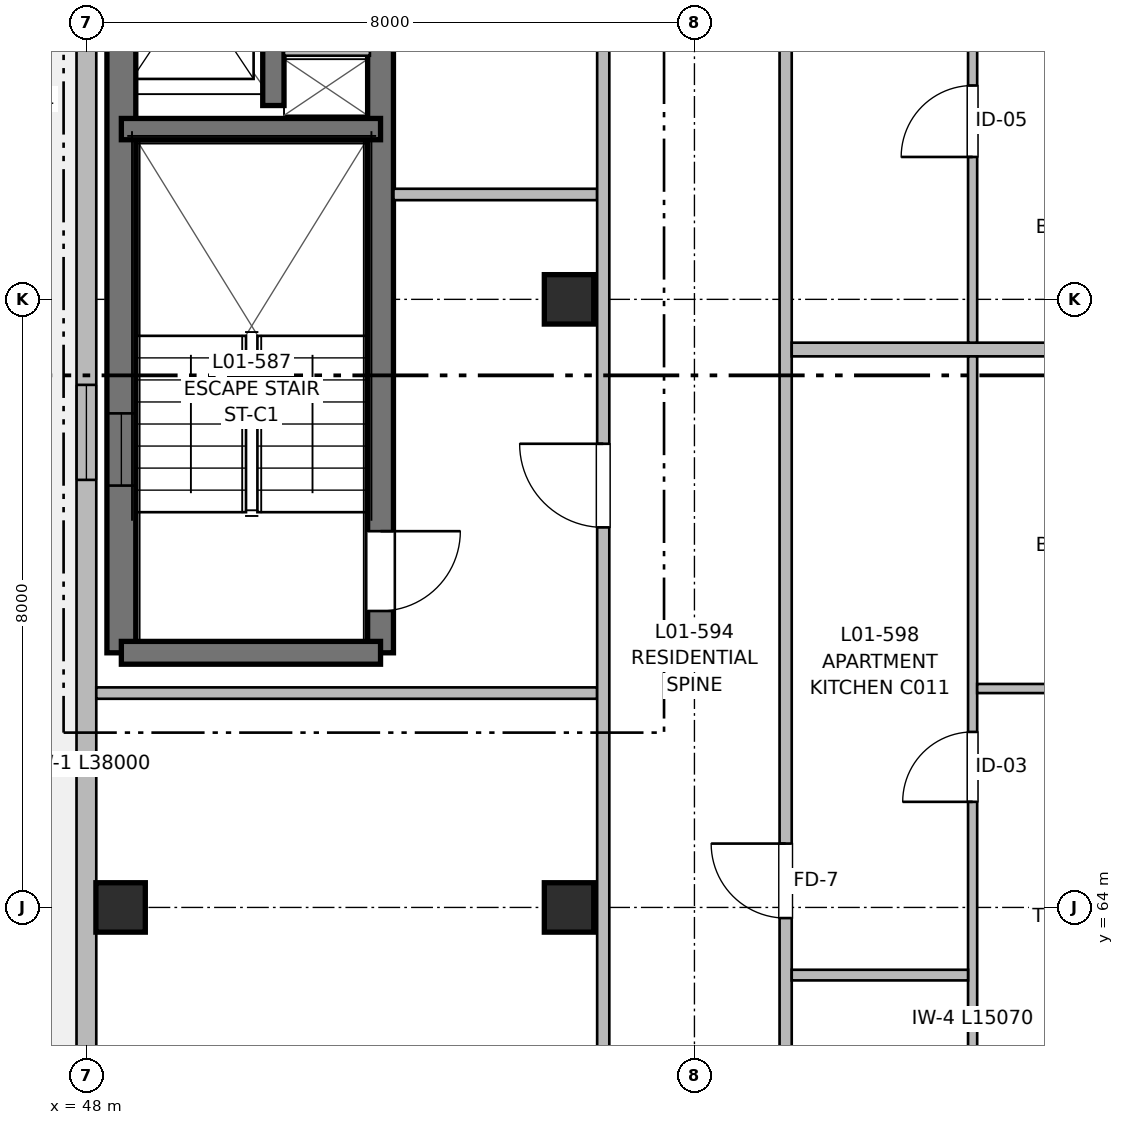
"""IFC4 building model, lengths in metres.
Left out: names, types, materials, properties, quantities, classifications, styles, units other than length and angle.
Written with IfcOpenShell. Run it as: python <this file> out.ifc"""

import sys

from ifc_helpers import new_model, si_unit, direction, frame, frame_2d, origin, origin_2d, place, context, subcontext, project, spatial, rectangle, extrude, element, fill, save


model = new_model("IFC4")
c1 = context("Model", 3, precision=1e-05, world=origin(), true_north=direction((0.0, 1.0)))
c2 = subcontext(c1, "Body", "Model", "MODEL_VIEW")
j1 = project(units=[si_unit("LENGTHUNIT", "METRE"), si_unit("PLANEANGLEUNIT", "RADIAN")], contexts=[c1])
p1 = place(None, origin())
s1 = spatial("IfcSite", under=j1, at=p1, CompositionType="ELEMENT")
p2 = place(p1, origin())
s2 = spatial("IfcBuilding", under=s1, at=p2, CompositionType="ELEMENT")
p3 = place(p2, frame((0.0, 0.0, 4.16)))
s3 = spatial("IfcBuildingStorey", under=s2, at=p3, CompositionType="ELEMENT", Elevation=4.16)
for number, where, z_axis, x_axis in (
    (1, (48.45, 64.0, 0.0), (0.0, 0.0, 1.0), (1.0, 0.0, 0.0)),
    (2, (54.35, 64.0, 0.0), (0.0, 0.0, 1.0), (1.0, 0.0, 0.0)),
    (3, (54.35, 72.0, 0.0), (0.0, 0.0, 1.0), (1.0, 0.0, 0.0)),
):
    element("IfcColumn", number, at=place(p3, frame(where, z_axis=z_axis, x_axis=x_axis)), inside=s3, PredefinedType="COLUMN", context=c2, shape_type="SweptSolid", body=[
        extrude(rectangle(XDim=0.65, YDim=0.65, at=origin_2d()), origin(), (0.0, 0.0, 1.0), 3.2),
    ])
p4 = place(p3, frame((48.46, 67.35, 0.0), z_axis=(0.0, 0.0, 1.0), x_axis=(0.0, 1.0, 0.0)))
e4 = element("IfcWall", 4, at=p4, inside=s3, PredefinedType="SHEAR", context=c2, shape_type="SweptSolid", body=[
    extrude(rectangle(XDim=12.45, YDim=0.38, at=frame_2d((6.225, 0.0))), origin(), (0.0, 0.0, 1.0), 3.2),
])
p5 = place(p4, frame((2.2, 0.0, 0.97)))
e5 = element("IfcOpeningElement", 5, at=p5, cuts=e4, PredefinedType="OPENING", context=c2, shape_type="SweptSolid", body=[
    extrude(rectangle(XDim=0.95, YDim=1.25, at=frame_2d((0.475, 0.625))), frame((0.0, 0.2, 0.0), z_axis=(0.0, -1.0, 0.0), x_axis=(1.0, 0.0, 0.0)), (0.0, 0.0, 1.0), 0.4),
])
p6 = place(p3, frame((51.87, 79.8, 0.0), z_axis=(0.0, 0.0, 1.0), x_axis=(0.0, -1.0, 0.0)))
e6 = element("IfcWall", 6, at=p6, inside=s3, PredefinedType="SHEAR", context=c2, shape_type="SweptSolid", body=[
    extrude(rectangle(XDim=12.45, YDim=0.34, at=frame_2d((6.225, 0.0))), origin(), (0.0, 0.0, 1.0), 3.2),
])
p7 = place(p6, frame((10.85, 0.0, 0.0)))
e7 = element("IfcOpeningElement", 7, at=p7, cuts=e6, PredefinedType="OPENING", context=c2, shape_type="SweptSolid", body=[
    extrude(rectangle(XDim=1.05, YDim=2.15, at=frame_2d((0.525, 1.075))), frame((0.0, 0.18, 0.0), z_axis=(0.0, -1.0, 0.0), x_axis=(1.0, 0.0, 0.0)), (0.0, 0.0, 1.0), 0.36),
])
p8 = place(p3, frame((51.87, 67.35, 0.0), z_axis=(0.0, 0.0, 1.0), x_axis=(-1.0, 0.0, 0.0)))
e8 = element("IfcWall", 8, at=p8, inside=s3, PredefinedType="SHEAR", context=c2, shape_type="SweptSolid", body=[
    extrude(rectangle(XDim=3.41, YDim=0.3, at=frame_2d((1.705, 0.0))), origin(), (0.0, 0.0, 1.0), 3.2),
])
p9 = place(p3, frame((48.46, 74.24, 0.0), z_axis=(0.0, 0.0, 1.0), x_axis=(1.0, 0.0, 0.0)))
e9 = element("IfcWall", 9, at=p9, inside=s3, PredefinedType="SHEAR", context=c2, shape_type="SweptSolid", body=[
    extrude(rectangle(XDim=3.41, YDim=0.28, at=frame_2d((1.705, 0.0))), origin(), (0.0, 0.0, 1.0), 3.2),
])
p10 = place(p3, frame((50.46, 74.55, 0.0), z_axis=(0.0, 0.0, 1.0), x_axis=(0.0, 1.0, 0.0)))
e10 = element("IfcWall", 10, at=p10, inside=s3, PredefinedType="SHEAR", context=c2, shape_type="SweptSolid", body=[
    extrude(rectangle(XDim=5.25, YDim=0.28, at=frame_2d((2.625, 0.0))), origin(), (0.0, 0.0, 1.0), 3.2),
])
p11 = place(p10, frame((1.15, 0.0, 0.0)))
e11 = element("IfcOpeningElement", 11, at=p11, cuts=e10, PredefinedType="OPENING", context=c2, shape_type="SweptSolid", body=[
    extrude(rectangle(XDim=1.0, YDim=2.15, at=frame_2d((0.5, 1.075))), frame((0.0, 0.15, 0.0), z_axis=(0.0, -1.0, 0.0), x_axis=(1.0, 0.0, 0.0)), (0.0, 0.0, 1.0), 0.3),
])
p12 = place(p10, frame((3.85, 0.0, 0.0)))
e12 = element("IfcOpeningElement", 12, at=p12, cuts=e10, PredefinedType="OPENING", context=c2, shape_type="SweptSolid", body=[
    extrude(rectangle(XDim=0.9, YDim=2.15, at=frame_2d((0.45, 1.075))), frame((0.0, 0.15, 0.0), z_axis=(0.0, -1.0, 0.0), x_axis=(1.0, 0.0, 0.0)), (0.0, 0.0, 1.0), 0.3),
])
p13 = place(p3, frame((50.6, 75.28, 0.0), z_axis=(0.0, 0.0, 1.0), x_axis=(1.0, 0.0, 0.0)))
e13 = element("IfcWall", 13, at=p13, inside=s3, PredefinedType="PARTITIONING", context=c2, shape_type="SweptSolid", body=[
    extrude(rectangle(XDim=1.13, YDim=0.15, at=frame_2d((0.565, 0.0))), origin(), (0.0, 0.0, 1.0), 2.95),
])
p14 = place(p3, frame((48.0, 56.0, 0.0), z_axis=(0.0, 0.0, 1.0), x_axis=(0.0, 1.0, 0.0)))
e14 = element("IfcWall", 14, at=p14, inside=s3, PredefinedType="SOLIDWALL", context=c2, shape_type="SweptSolid", body=[
    extrude(rectangle(XDim=38.0, YDim=0.26, at=frame_2d((19.0, 0.0))), origin(), (0.0, 0.0, 1.0), 2.98),
])
p15 = place(p14, frame((4.95, 0.0, 0.0)))
e15 = element("IfcOpeningElement", 15, at=p15, cuts=e14, PredefinedType="OPENING", context=c2, shape_type="SweptSolid", body=[
    extrude(rectangle(XDim=1.2, YDim=2.2, at=frame_2d((0.6, 1.1))), frame((0.0, 0.14, 0.0), z_axis=(0.0, -1.0, 0.0), x_axis=(1.0, 0.0, 0.0)), (0.0, 0.0, 1.0), 0.28),
])
p16 = place(p14, frame((13.625, 0.0, 0.87)))
e16 = element("IfcOpeningElement", 16, at=p16, cuts=e14, PredefinedType="OPENING", context=c2, shape_type="SweptSolid", body=[
    extrude(rectangle(XDim=1.25, YDim=1.35, at=frame_2d((0.625, 0.675))), frame((0.0, 0.14, 0.0), z_axis=(0.0, -1.0, 0.0), x_axis=(1.0, 0.0, 0.0)), (0.0, 0.0, 1.0), 0.28),
])
p17 = place(p14, frame((23.95, 0.0, 0.82)))
e17 = element("IfcOpeningElement", 17, at=p17, cuts=e14, PredefinedType="OPENING", context=c2, shape_type="SweptSolid", body=[
    extrude(rectangle(XDim=1.3, YDim=1.4, at=frame_2d((0.65, 0.7))), frame((0.0, 0.14, 0.0), z_axis=(0.0, -1.0, 0.0), x_axis=(1.0, 0.0, 0.0)), (0.0, 0.0, 1.0), 0.28),
])
p18 = place(p14, frame((32.2, 0.0, 0.67)))
e18 = element("IfcOpeningElement", 18, at=p18, cuts=e14, PredefinedType="OPENING", context=c2, shape_type="SweptSolid", body=[
    extrude(rectangle(XDim=2.1, YDim=1.55, at=frame_2d((1.05, 0.775))), frame((0.0, 0.14, 0.0), z_axis=(0.0, -1.0, 0.0), x_axis=(1.0, 0.0, 0.0)), (0.0, 0.0, 1.0), 0.28),
])
p19 = place(p3, frame((48.13, 66.82, 0.0), z_axis=(0.0, 0.0, 1.0), x_axis=(1.0, 0.0, 0.0)))
e19 = element("IfcWall", 19, at=p19, inside=s3, PredefinedType="PARTITIONING", context=c2, shape_type="SweptSolid", body=[
    extrude(rectangle(XDim=6.59, YDim=0.15, at=frame_2d((3.295, 0.0))), origin(), (0.0, 0.0, 1.0), 2.935),
])
p20 = place(p3, frame((52.04, 73.38, 0.0), z_axis=(0.0, 0.0, 1.0), x_axis=(1.0, 0.0, 0.0)))
e20 = element("IfcWall", 20, at=p20, inside=s3, PredefinedType="PARTITIONING", context=c2, shape_type="SweptSolid", body=[
    extrude(rectangle(XDim=2.68, YDim=0.15, at=frame_2d((1.34, 0.0))), origin(), (0.0, 0.0, 1.0), 2.935),
])
p21 = place(p3, frame((54.8, 56.18, 0.0), z_axis=(0.0, 0.0, 1.0), x_axis=(0.0, 1.0, 0.0)))
e21 = element("IfcWall", 21, at=p21, inside=s3, PredefinedType="PARTITIONING", context=c2, shape_type="SweptSolid", body=[
    extrude(rectangle(XDim=50.62, YDim=0.16, at=frame_2d((25.31, 0.0))), origin(), (0.0, 0.0, 1.0), 2.935),
])
p22 = place(p21, frame((12.82, 0.0, 0.0)))
e22 = element("IfcOpeningElement", 22, at=p22, cuts=e21, PredefinedType="OPENING", context=c2, shape_type="SweptSolid", body=[
    extrude(rectangle(XDim=1.1, YDim=2.15, at=frame_2d((0.55, 1.075))), frame((0.0, 0.09, 0.0), z_axis=(0.0, -1.0, 0.0), x_axis=(1.0, 0.0, 0.0)), (0.0, 0.0, 1.0), 0.18),
])
p23 = place(p21, frame((19.22, 0.0, 0.0)))
e23 = element("IfcOpeningElement", 23, at=p23, cuts=e21, PredefinedType="OPENING", context=c2, shape_type="SweptSolid", body=[
    extrude(rectangle(XDim=1.6, YDim=2.15, at=frame_2d((0.8, 1.075))), frame((0.0, 0.09, 0.0), z_axis=(0.0, -1.0, 0.0), x_axis=(1.0, 0.0, 0.0)), (0.0, 0.0, 1.0), 0.18),
])
p24 = place(p21, frame((1.8, 0.0, 0.0)))
e24 = element("IfcOpeningElement", 24, at=p24, cuts=e21, PredefinedType="OPENING", context=c2, shape_type="SweptSolid", body=[
    extrude(rectangle(XDim=0.96, YDim=2.15, at=frame_2d((0.48, 1.075))), frame((0.0, 0.09, 0.0), z_axis=(0.0, -1.0, 0.0), x_axis=(1.0, 0.0, 0.0)), (0.0, 0.0, 1.0), 0.18),
])
p25 = place(p21, frame((32.725, 0.0, 0.0)))
e25 = element("IfcOpeningElement", 25, at=p25, cuts=e21, PredefinedType="OPENING", context=c2, shape_type="SweptSolid", body=[
    extrude(rectangle(XDim=0.98, YDim=2.15, at=frame_2d((0.49, 1.075))), frame((0.0, 0.09, 0.0), z_axis=(0.0, -1.0, 0.0), x_axis=(1.0, 0.0, 0.0)), (0.0, 0.0, 1.0), 0.18),
])
p26 = place(p21, frame((40.935, 0.0, 0.0)))
e26 = element("IfcOpeningElement", 26, at=p26, cuts=e21, PredefinedType="OPENING", context=c2, shape_type="SweptSolid", body=[
    extrude(rectangle(XDim=0.98, YDim=2.15, at=frame_2d((0.49, 1.075))), frame((0.0, 0.09, 0.0), z_axis=(0.0, -1.0, 0.0), x_axis=(1.0, 0.0, 0.0)), (0.0, 0.0, 1.0), 0.18),
])
p27 = place(p3, frame((57.2, 56.18, 0.0), z_axis=(0.0, 0.0, 1.0), x_axis=(0.0, 1.0, 0.0)))
e27 = element("IfcWall", 27, at=p27, inside=s3, PredefinedType="PARTITIONING", context=c2, shape_type="SweptSolid", body=[
    extrude(rectangle(XDim=50.62, YDim=0.16, at=frame_2d((25.31, 0.0))), origin(), (0.0, 0.0, 1.0), 2.935),
])
p28 = place(p27, frame((7.68, 0.0, 0.0)))
e28 = element("IfcOpeningElement", 28, at=p28, cuts=e27, PredefinedType="OPENING", context=c2, shape_type="SweptSolid", body=[
    extrude(rectangle(XDim=0.98, YDim=2.15, at=frame_2d((0.49, 1.075))), frame((0.0, 0.09, 0.0), z_axis=(0.0, -1.0, 0.0), x_axis=(1.0, 0.0, 0.0)), (0.0, 0.0, 1.0), 0.18),
])
p29 = place(p27, frame((22.43, 0.0, 0.0)))
e29 = element("IfcOpeningElement", 29, at=p29, cuts=e27, PredefinedType="OPENING", context=c2, shape_type="SweptSolid", body=[
    extrude(rectangle(XDim=1.02, YDim=2.15, at=frame_2d((0.51, 1.075))), frame((0.0, 0.09, 0.0), z_axis=(0.0, -1.0, 0.0), x_axis=(1.0, 0.0, 0.0)), (0.0, 0.0, 1.0), 0.18),
])
p30 = place(p27, frame((35.65, 0.0, 0.0)))
e30 = element("IfcOpeningElement", 30, at=p30, cuts=e27, PredefinedType="OPENING", context=c2, shape_type="SweptSolid", body=[
    extrude(rectangle(XDim=0.98, YDim=2.15, at=frame_2d((0.49, 1.075))), frame((0.0, 0.09, 0.0), z_axis=(0.0, -1.0, 0.0), x_axis=(1.0, 0.0, 0.0)), (0.0, 0.0, 1.0), 0.18),
])
p31 = place(p27, frame((46.42, 0.0, 0.0)))
e31 = element("IfcOpeningElement", 31, at=p31, cuts=e27, PredefinedType="OPENING", context=c2, shape_type="SweptSolid", body=[
    extrude(rectangle(XDim=0.98, YDim=2.15, at=frame_2d((0.49, 1.075))), frame((0.0, 0.09, 0.0), z_axis=(0.0, -1.0, 0.0), x_axis=(1.0, 0.0, 0.0)), (0.0, 0.0, 1.0), 0.18),
])
p32 = place(p3, frame((57.28, 71.34, 0.0), z_axis=(0.0, 0.0, 1.0), x_axis=(1.0, 0.0, 0.0)))
e32 = element("IfcWall", 32, at=p32, inside=s3, PredefinedType="PARTITIONING", context=c2, shape_type="SweptSolid", body=[
    extrude(rectangle(XDim=6.59, YDim=0.18, at=frame_2d((3.295, 0.0))), origin(), (0.0, 0.0, 1.0), 2.935),
])
p33 = place(p3, frame((59.66, 56.18, 0.0), z_axis=(0.0, 0.0, 1.0), x_axis=(0.0, 1.0, 0.0)))
e33 = element("IfcWall", 33, at=p33, inside=s3, PredefinedType="PARTITIONING", context=c2, shape_type="SweptSolid", body=[
    extrude(rectangle(XDim=15.07, YDim=0.12, at=frame_2d((7.535, 0.0))), origin(), (0.0, 0.0, 1.0), 2.935),
])
p34 = place(p33, frame((2.633, 0.0, 0.0)))
e34 = element("IfcOpeningElement", 34, at=p34, cuts=e33, PredefinedType="OPENING", context=c2, shape_type="SweptSolid", body=[
    extrude(rectangle(XDim=0.86, YDim=2.1, at=frame_2d((0.43, 1.05))), frame((0.0, 0.07, 0.0), z_axis=(0.0, -1.0, 0.0), x_axis=(1.0, 0.0, 0.0)), (0.0, 0.0, 1.0), 0.14),
])
p35 = place(p33, frame((9.209, 0.0, 0.0)))
e35 = element("IfcOpeningElement", 35, at=p35, cuts=e33, PredefinedType="OPENING", context=c2, shape_type="SweptSolid", body=[
    extrude(rectangle(XDim=0.92, YDim=2.1, at=frame_2d((0.46, 1.05))), frame((0.0, 0.07, 0.0), z_axis=(0.0, -1.0, 0.0), x_axis=(1.0, 0.0, 0.0)), (0.0, 0.0, 1.0), 0.14),
])
p36 = place(p3, frame((57.28, 63.11, 0.0), z_axis=(0.0, 0.0, 1.0), x_axis=(1.0, 0.0, 0.0)))
e36 = element("IfcWall", 36, at=p36, inside=s3, PredefinedType="PARTITIONING", context=c2, shape_type="SweptSolid", body=[
    extrude(rectangle(XDim=2.32, YDim=0.14, at=frame_2d((1.16, 0.0))), origin(), (0.0, 0.0, 1.0), 2.935),
])
p37 = place(p3, frame((59.72, 66.88, 0.0), z_axis=(0.0, 0.0, 1.0), x_axis=(1.0, 0.0, 0.0)))
e37 = element("IfcWall", 37, at=p37, inside=s3, PredefinedType="PARTITIONING", context=c2, shape_type="SweptSolid", body=[
    extrude(rectangle(XDim=4.15, YDim=0.12, at=frame_2d((2.075, 0.0))), origin(), (0.0, 0.0, 1.0), 2.935),
])
p38 = place(p37, frame((1.635, 0.0, 0.0)))
e38 = element("IfcOpeningElement", 38, at=p38, cuts=e37, PredefinedType="OPENING", context=c2, shape_type="SweptSolid", body=[
    extrude(rectangle(XDim=0.88, YDim=2.1, at=frame_2d((0.44, 1.05))), frame((0.0, 0.07, 0.0), z_axis=(0.0, -1.0, 0.0), x_axis=(1.0, 0.0, 0.0)), (0.0, 0.0, 1.0), 0.14),
])
p39 = place(p3, frame((59.66, 71.43, 0.0), z_axis=(0.0, 0.0, 1.0), x_axis=(0.0, 1.0, 0.0)))
e39 = element("IfcWall", 39, at=p39, inside=s3, PredefinedType="PARTITIONING", context=c2, shape_type="SweptSolid", body=[
    extrude(rectangle(XDim=13.97, YDim=0.12, at=frame_2d((6.985, 0.0))), origin(), (0.0, 0.0, 1.0), 2.935),
])
p40 = place(p39, frame((2.443, 0.0, 0.0)))
e40 = element("IfcOpeningElement", 40, at=p40, cuts=e39, PredefinedType="OPENING", context=c2, shape_type="SweptSolid", body=[
    extrude(rectangle(XDim=0.94, YDim=2.1, at=frame_2d((0.47, 1.05))), frame((0.0, 0.07, 0.0), z_axis=(0.0, -1.0, 0.0), x_axis=(1.0, 0.0, 0.0)), (0.0, 0.0, 1.0), 0.14),
])
p41 = place(p39, frame((8.541, 0.0, 0.0)))
e41 = element("IfcOpeningElement", 41, at=p41, cuts=e39, PredefinedType="OPENING", context=c2, shape_type="SweptSolid", body=[
    extrude(rectangle(XDim=0.92, YDim=2.1, at=frame_2d((0.46, 1.05))), frame((0.0, 0.07, 0.0), z_axis=(0.0, -1.0, 0.0), x_axis=(1.0, 0.0, 0.0)), (0.0, 0.0, 1.0), 0.14),
])
p42 = place(p7, origin())
e42 = element("IfcDoor", 42, at=p42, inside=s3, OperationType="SINGLE_SWING_LEFT", PredefinedType="DOOR", context=c2, shape_type="SweptSolid", body=[
    extrude(rectangle(XDim=1.05, YDim=2.15, at=frame_2d((0.525, 1.075))), frame((0.0, 0.025, 0.0), z_axis=(0.0, -1.0, 0.0), x_axis=(1.0, 0.0, 0.0)), (0.0, 0.0, 1.0), 0.05),
])
fill(e7, e42)
p43 = place(p5, origin())
e43 = element("IfcWindow", 43, at=p43, inside=s3, PartitioningType="SINGLE_PANEL", PredefinedType="WINDOW", context=c2, shape_type="SweptSolid", body=[
    extrude(rectangle(XDim=0.95, YDim=1.25, at=frame_2d((0.475, 0.625))), frame((0.0, 0.03, 0.0), z_axis=(0.0, -1.0, 0.0), x_axis=(1.0, 0.0, 0.0)), (0.0, 0.0, 1.0), 0.06),
])
fill(e5, e43)
p44 = place(p16, origin())
e44 = element("IfcWindow", 44, at=p44, inside=s3, PartitioningType="SINGLE_PANEL", PredefinedType="WINDOW", context=c2, shape_type="SweptSolid", body=[
    extrude(rectangle(XDim=1.25, YDim=1.35, at=frame_2d((0.625, 0.675))), frame((0.0, 0.03, 0.0), z_axis=(0.0, -1.0, 0.0), x_axis=(1.0, 0.0, 0.0)), (0.0, 0.0, 1.0), 0.06),
])
fill(e16, e44)
p45 = place(p22, origin())
e45 = element("IfcDoor", 45, at=p45, inside=s3, OperationType="SINGLE_SWING_RIGHT", PredefinedType="DOOR", context=c2, shape_type="SweptSolid", body=[
    extrude(rectangle(XDim=1.1, YDim=2.15, at=frame_2d((0.55, 1.075))), frame((0.0, 0.025, 0.0), z_axis=(0.0, -1.0, 0.0), x_axis=(1.0, 0.0, 0.0)), (0.0, 0.0, 1.0), 0.05),
])
fill(e22, e45)
p46 = place(p35, origin())
e46 = element("IfcDoor", 46, at=p46, inside=s3, OperationType="SINGLE_SWING_LEFT", PredefinedType="DOOR", context=c2, shape_type="SweptSolid", body=[
    extrude(rectangle(XDim=0.92, YDim=2.1, at=frame_2d((0.46, 1.05))), frame((0.0, 0.025, 0.0), z_axis=(0.0, -1.0, 0.0), x_axis=(1.0, 0.0, 0.0)), (0.0, 0.0, 1.0), 0.05),
])
fill(e35, e46)
p47 = place(p28, origin())
e47 = element("IfcDoor", 47, at=p47, inside=s3, OperationType="SINGLE_SWING_RIGHT", PredefinedType="DOOR", context=c2, shape_type="SweptSolid", body=[
    extrude(rectangle(XDim=0.98, YDim=2.15, at=frame_2d((0.49, 1.075))), frame((0.0, 0.025, 0.0), z_axis=(0.0, -1.0, 0.0), x_axis=(1.0, 0.0, 0.0)), (0.0, 0.0, 1.0), 0.05),
])
fill(e28, e47)
p48 = place(p40, origin())
e48 = element("IfcDoor", 48, at=p48, inside=s3, OperationType="SINGLE_SWING_LEFT", PredefinedType="DOOR", context=c2, shape_type="SweptSolid", body=[
    extrude(rectangle(XDim=0.94, YDim=2.1, at=frame_2d((0.47, 1.05))), frame((0.0, 0.025, 0.0), z_axis=(0.0, -1.0, 0.0), x_axis=(1.0, 0.0, 0.0)), (0.0, 0.0, 1.0), 0.05),
])
fill(e40, e48)
save(model, sys.argv[1])
